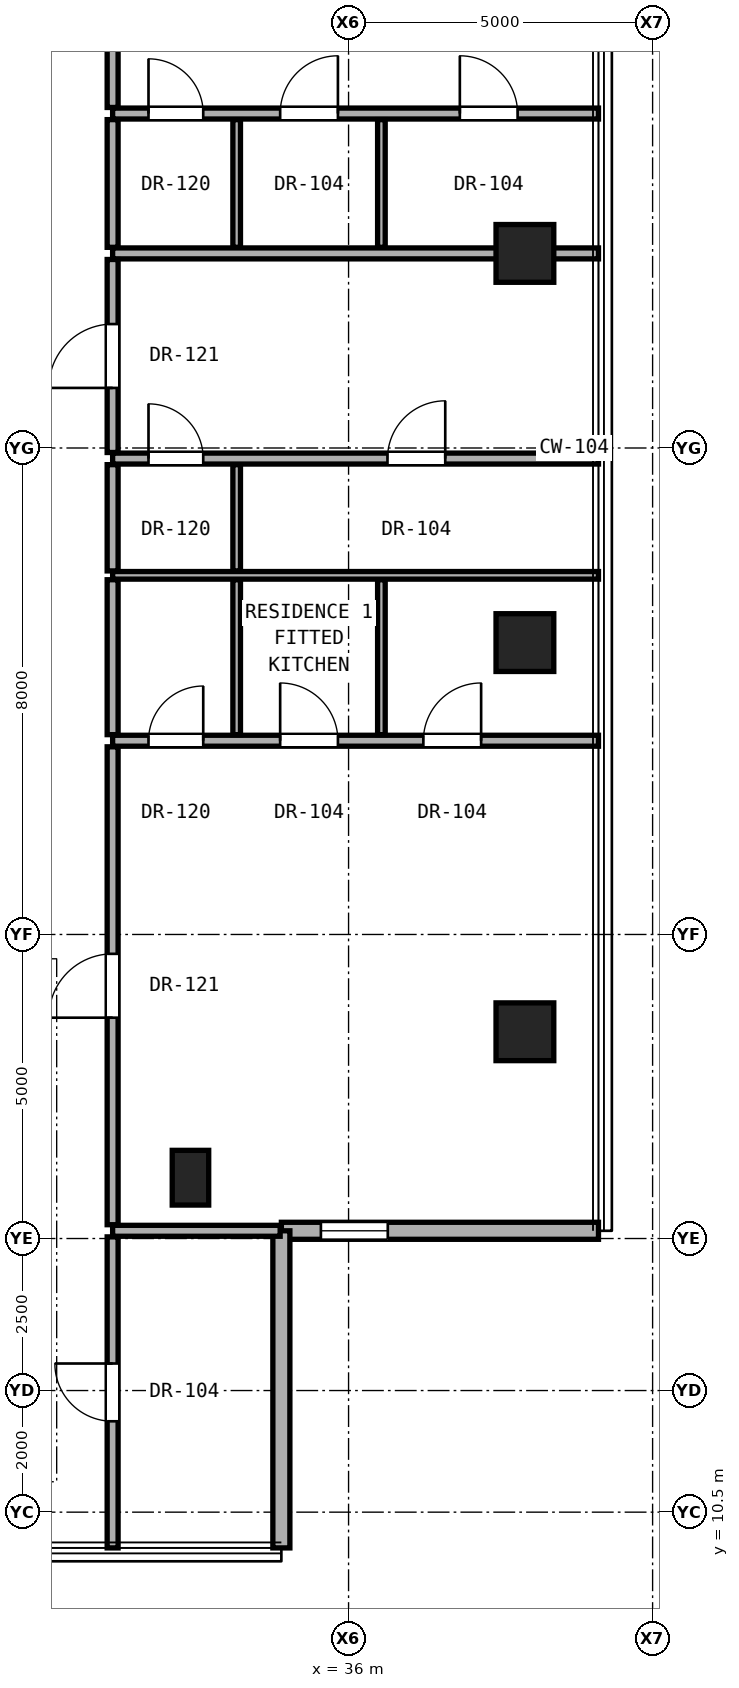
"""IFC4 building model, lengths in metres.
Left out: names, types, materials, properties, quantities, classifications, styles, units other than length and angle.
Written with IfcOpenShell. Run it as: python <this file> out.ifc"""

import sys

from ifc_helpers import new_model, si_unit, direction, frame, frame_2d, origin, origin_2d, place, context, subcontext, project, spatial, rectangle, hollow_rectangle, extrude, element, fill, save


model = new_model("IFC4")
c1 = context("Model", 3, precision=1e-05, world=origin(), true_north=direction((0.0, 1.0)))
c2 = subcontext(c1, "Body", "Model", "MODEL_VIEW")
j1 = project(units=[si_unit("LENGTHUNIT", "METRE"), si_unit("PLANEANGLEUNIT", "RADIAN")], contexts=[c1])
p1 = place(None, origin())
s1 = spatial("IfcSite", under=j1, at=p1, CompositionType="ELEMENT")
p2 = place(p1, origin())
s2 = spatial("IfcBuilding", under=s1, at=p2, CompositionType="ELEMENT")
p3 = place(p2, frame((0.0, 0.0, 186.9)))
s3 = spatial("IfcBuildingStorey", under=s2, at=p3, CompositionType="ELEMENT", Elevation=186.9)
for number, where, z_axis, x_axis in (
    (1, (38.9, 18.4, 0.0), (0.0, 0.0, 1.0), (1.0, 0.0, 0.0)),
    (2, (38.9, 24.8, 0.0), (0.0, 0.0, 1.0), (1.0, 0.0, 0.0)),
    (3, (38.9, 31.2, 0.0), (0.0, 0.0, 1.0), (1.0, 0.0, 0.0)),
):
    element("IfcColumn", number, at=place(p3, frame(where, z_axis=z_axis, x_axis=x_axis)), inside=s3, PredefinedType="COLUMN", context=c2, shape_type="SweptSolid", body=[
        extrude(hollow_rectangle(XDim=0.95, YDim=0.95, WallThickness=0.05, at=origin_2d()), origin(), (0.0, 0.0, 1.0), 3.25),
    ])
p4 = place(p3, frame((33.4, 16.0, 0.0), z_axis=(0.0, 0.0, 1.0), x_axis=(1.0, 0.0, 0.0)))
e4 = element("IfcColumn", 4, at=p4, inside=s3, PredefinedType="PILASTER", context=c2, shape_type="SweptSolid", body=[
    extrude(rectangle(XDim=0.6, YDim=0.9, at=origin_2d()), origin(), (0.0, 0.0, 1.0), 3.25),
])
p5 = place(p3, frame((34.895, 15.127, 0.0), z_axis=(0.0, 0.0, 1.0), x_axis=(1.0, 0.0, 0.0)))
e5 = element("IfcWall", 5, at=p5, inside=s3, PredefinedType="SOLIDWALL", context=c2, shape_type="SweptSolid", body=[
    extrude(rectangle(XDim=5.215, YDim=0.28, at=frame_2d((2.607, 0.0))), origin(), (0.0, 0.0, 1.0), 3.03),
])
p6 = place(p5, frame((0.65, 0.0, 0.85)))
e6 = element("IfcOpeningElement", 6, at=p6, cuts=e5, PredefinedType="OPENING", context=c2, shape_type="SweptSolid", body=[
    extrude(rectangle(XDim=1.1, YDim=2.0, at=frame_2d((0.55, 1.0))), frame((0.0, 0.15, 0.0), z_axis=(0.0, -1.0, 0.0), x_axis=(1.0, 0.0, 0.0)), (0.0, 0.0, 1.0), 0.3),
])
p7 = place(p3, frame((34.895, 9.912, 0.0), z_axis=(0.0, 0.0, 1.0), x_axis=(0.0, 1.0, 0.0)))
e7 = element("IfcWall", 7, at=p7, inside=s3, PredefinedType="SOLIDWALL", context=c2, shape_type="SweptSolid", body=[
    extrude(rectangle(XDim=5.215, YDim=0.28, at=frame_2d((2.607, 0.0))), origin(), (0.0, 0.0, 1.0), 3.03),
])
p8 = place(p3, frame((32.12, 15.127, 0.0), z_axis=(0.0, 0.0, 1.0), x_axis=(1.0, 0.0, 0.0)))
e8 = element("IfcWall", 8, at=p8, inside=s3, PredefinedType="PARTITIONING", context=c2, shape_type="SweptSolid", body=[
    extrude(rectangle(XDim=2.755, YDim=0.18, at=frame_2d((1.377, 0.0))), origin(), (0.0, 0.0, 1.0), 3.05),
])
p9 = place(p3, frame((32.12, 23.186, 0.0), z_axis=(0.0, 0.0, 1.0), x_axis=(1.0, 0.0, 0.0)))
e9 = element("IfcWall", 9, at=p9, inside=s3, PredefinedType="PARTITIONING", context=c2, shape_type="SweptSolid", body=[
    extrude(rectangle(XDim=7.99, YDim=0.18, at=frame_2d((3.995, 0.0))), origin(), (0.0, 0.0, 1.0), 2.269),
])
p10 = place(p9, frame((5.11, 0.0, 0.0)))
e10 = element("IfcOpeningElement", 10, at=p10, cuts=e9, PredefinedType="OPENING", context=c2, shape_type="SweptSolid", body=[
    extrude(rectangle(XDim=0.95, YDim=2.15, at=frame_2d((0.475, 1.075))), frame((0.0, 0.1, 0.0), z_axis=(0.0, -1.0, 0.0), x_axis=(1.0, 0.0, 0.0)), (0.0, 0.0, 1.0), 0.2),
])
p11 = place(p9, frame((2.755, 0.0, 0.0)))
e11 = element("IfcOpeningElement", 11, at=p11, cuts=e9, PredefinedType="OPENING", context=c2, shape_type="SweptSolid", body=[
    extrude(rectangle(XDim=0.95, YDim=2.15, at=frame_2d((0.475, 1.075))), frame((0.0, 0.1, 0.0), z_axis=(0.0, -1.0, 0.0), x_axis=(1.0, 0.0, 0.0)), (0.0, 0.0, 1.0), 0.2),
])
p12 = place(p9, frame((0.59, 0.0, 0.0)))
e12 = element("IfcOpeningElement", 12, at=p12, cuts=e9, PredefinedType="OPENING", context=c2, shape_type="SweptSolid", body=[
    extrude(rectangle(XDim=0.9, YDim=2.1, at=frame_2d((0.45, 1.05))), frame((0.0, 0.1, 0.0), z_axis=(0.0, -1.0, 0.0), x_axis=(1.0, 0.0, 0.0)), (0.0, 0.0, 1.0), 0.2),
])
p13 = place(p3, frame((32.12, 25.906, 0.0), z_axis=(0.0, 0.0, 1.0), x_axis=(1.0, 0.0, 0.0)))
e13 = element("IfcWall", 13, at=p13, inside=s3, PredefinedType="PARTITIONING", context=c2, shape_type="SweptSolid", body=[
    extrude(rectangle(XDim=7.99, YDim=0.125, at=frame_2d((3.995, 0.0))), origin(), (0.0, 0.0, 1.0), 2.269),
])
p14 = place(p3, frame((32.12, 27.826, 0.0), z_axis=(0.0, 0.0, 1.0), x_axis=(1.0, 0.0, 0.0)))
e14 = element("IfcWall", 14, at=p14, inside=s3, PredefinedType="PARTITIONING", context=c2, shape_type="SweptSolid", body=[
    extrude(rectangle(XDim=7.99, YDim=0.18, at=frame_2d((3.995, 0.0))), origin(), (0.0, 0.0, 1.0), 2.269),
])
p15 = place(p14, frame((4.52, 0.0, 0.0)))
e15 = element("IfcOpeningElement", 15, at=p15, cuts=e14, PredefinedType="OPENING", context=c2, shape_type="SweptSolid", body=[
    extrude(rectangle(XDim=0.95, YDim=2.15, at=frame_2d((0.475, 1.075))), frame((0.0, 0.1, 0.0), z_axis=(0.0, -1.0, 0.0), x_axis=(1.0, 0.0, 0.0)), (0.0, 0.0, 1.0), 0.2),
])
p16 = place(p14, frame((0.59, 0.0, 0.0)))
e16 = element("IfcOpeningElement", 16, at=p16, cuts=e14, PredefinedType="OPENING", context=c2, shape_type="SweptSolid", body=[
    extrude(rectangle(XDim=0.9, YDim=2.1, at=frame_2d((0.45, 1.05))), frame((0.0, 0.1, 0.0), z_axis=(0.0, -1.0, 0.0), x_axis=(1.0, 0.0, 0.0)), (0.0, 0.0, 1.0), 0.2),
])
p17 = place(p3, frame((32.12, 31.2, 0.0), z_axis=(0.0, 0.0, 1.0), x_axis=(1.0, 0.0, 0.0)))
e17 = element("IfcWall", 17, at=p17, inside=s3, PredefinedType="PARTITIONING", context=c2, shape_type="SweptSolid", body=[
    extrude(rectangle(XDim=7.99, YDim=0.18, at=frame_2d((3.995, 0.0))), origin(), (0.0, 0.0, 1.0), 2.269),
])
p18 = place(p3, frame((32.12, 33.5, 0.0), z_axis=(0.0, 0.0, 1.0), x_axis=(1.0, 0.0, 0.0)))
e18 = element("IfcWall", 18, at=p18, inside=s3, PredefinedType="PARTITIONING", context=c2, shape_type="SweptSolid", body=[
    extrude(rectangle(XDim=7.99, YDim=0.18, at=frame_2d((3.995, 0.0))), origin(), (0.0, 0.0, 1.0), 2.269),
])
p19 = place(p18, frame((5.71, 0.0, 0.0)))
e19 = element("IfcOpeningElement", 19, at=p19, cuts=e18, PredefinedType="OPENING", context=c2, shape_type="SweptSolid", body=[
    extrude(rectangle(XDim=0.95, YDim=2.15, at=frame_2d((0.475, 1.075))), frame((0.0, 0.1, 0.0), z_axis=(0.0, -1.0, 0.0), x_axis=(1.0, 0.0, 0.0)), (0.0, 0.0, 1.0), 0.2),
])
p20 = place(p18, frame((2.755, 0.0, 0.0)))
e20 = element("IfcOpeningElement", 20, at=p20, cuts=e18, PredefinedType="OPENING", context=c2, shape_type="SweptSolid", body=[
    extrude(rectangle(XDim=0.95, YDim=2.15, at=frame_2d((0.475, 1.075))), frame((0.0, 0.1, 0.0), z_axis=(0.0, -1.0, 0.0), x_axis=(1.0, 0.0, 0.0)), (0.0, 0.0, 1.0), 0.2),
])
p21 = place(p18, frame((0.59, 0.0, 0.0)))
e21 = element("IfcOpeningElement", 21, at=p21, cuts=e18, PredefinedType="OPENING", context=c2, shape_type="SweptSolid", body=[
    extrude(rectangle(XDim=0.9, YDim=2.1, at=frame_2d((0.45, 1.05))), frame((0.0, 0.1, 0.0), z_axis=(0.0, -1.0, 0.0), x_axis=(1.0, 0.0, 0.0)), (0.0, 0.0, 1.0), 0.2),
])
p22 = place(p3, frame((32.12, 9.912, 0.0), z_axis=(0.0, 0.0, 1.0), x_axis=(0.0, 1.0, 0.0)))
e22 = element("IfcWall", 22, at=p22, inside=s3, PredefinedType="PARTITIONING", context=c2, shape_type="SweptSolid", body=[
    extrude(rectangle(XDim=5.115, YDim=0.18, at=frame_2d((2.558, 0.0))), origin(), (0.0, 0.0, 1.0), 3.05),
])
p23 = place(p22, frame((2.083, 0.0, 0.0)))
e23 = element("IfcOpeningElement", 23, at=p23, cuts=e22, PredefinedType="OPENING", context=c2, shape_type="SweptSolid", body=[
    extrude(rectangle(XDim=0.95, YDim=2.15, at=frame_2d((0.475, 1.075))), frame((0.0, 0.1, 0.0), z_axis=(0.0, -1.0, 0.0), x_axis=(1.0, 0.0, 0.0)), (0.0, 0.0, 1.0), 0.2),
])
p24 = place(p3, frame((32.12, 15.227, 0.0), z_axis=(0.0, 0.0, 1.0), x_axis=(0.0, 1.0, 0.0)))
e24 = element("IfcWall", 24, at=p24, inside=s3, PredefinedType="PARTITIONING", context=c2, shape_type="SweptSolid", body=[
    extrude(rectangle(XDim=7.859, YDim=0.18, at=frame_2d((3.929, 0.0))), origin(), (0.0, 0.0, 1.0), 2.442),
])
p25 = place(p24, frame((3.405, 0.0, 0.0)))
e25 = element("IfcOpeningElement", 25, at=p25, cuts=e24, PredefinedType="OPENING", context=c2, shape_type="SweptSolid", body=[
    extrude(rectangle(XDim=1.05, YDim=2.2, at=frame_2d((0.525, 1.1))), frame((0.0, 0.1, 0.0), z_axis=(0.0, -1.0, 0.0), x_axis=(1.0, 0.0, 0.0)), (0.0, 0.0, 1.0), 0.2),
])
p26 = place(p3, frame((32.12, 23.286, 0.0), z_axis=(0.0, 0.0, 1.0), x_axis=(0.0, 1.0, 0.0)))
e26 = element("IfcWall", 26, at=p26, inside=s3, PredefinedType="PARTITIONING", context=c2, shape_type="SweptSolid", body=[
    extrude(rectangle(XDim=2.548, YDim=0.18, at=frame_2d((1.274, 0.0))), origin(), (0.0, 0.0, 1.0), 2.346),
])
p27 = place(p3, frame((32.12, 25.979, 0.0), z_axis=(0.0, 0.0, 1.0), x_axis=(0.0, 1.0, 0.0)))
e27 = element("IfcWall", 27, at=p27, inside=s3, PredefinedType="PARTITIONING", context=c2, shape_type="SweptSolid", body=[
    extrude(rectangle(XDim=1.748, YDim=0.18, at=frame_2d((0.874, 0.0))), origin(), (0.0, 0.0, 1.0), 3.05),
])
p28 = place(p3, frame((32.12, 27.926, 0.0), z_axis=(0.0, 0.0, 1.0), x_axis=(0.0, 1.0, 0.0)))
e28 = element("IfcWall", 28, at=p28, inside=s3, PredefinedType="PARTITIONING", context=c2, shape_type="SweptSolid", body=[
    extrude(rectangle(XDim=3.174, YDim=0.18, at=frame_2d((1.587, 0.0))), origin(), (0.0, 0.0, 1.0), 2.346),
])
p29 = place(p28, frame((1.062, 0.0, 0.0)))
e29 = element("IfcOpeningElement", 29, at=p29, cuts=e28, PredefinedType="OPENING", context=c2, shape_type="SweptSolid", body=[
    extrude(rectangle(XDim=1.05, YDim=2.2, at=frame_2d((0.525, 1.1))), frame((0.0, 0.1, 0.0), z_axis=(0.0, -1.0, 0.0), x_axis=(1.0, 0.0, 0.0)), (0.0, 0.0, 1.0), 0.2),
])
p30 = place(p3, frame((32.12, 31.3, 0.0), z_axis=(0.0, 0.0, 1.0), x_axis=(0.0, 1.0, 0.0)))
e30 = element("IfcWall", 30, at=p30, inside=s3, PredefinedType="PARTITIONING", context=c2, shape_type="SweptSolid", body=[
    extrude(rectangle(XDim=2.1, YDim=0.18, at=frame_2d((1.05, 0.0))), origin(), (0.0, 0.0, 1.0), 2.346),
])
p31 = place(p3, frame((32.12, 33.6, 0.0), z_axis=(0.0, 0.0, 1.0), x_axis=(0.0, 1.0, 0.0)))
e31 = element("IfcWall", 31, at=p31, inside=s3, PredefinedType="PARTITIONING", context=c2, shape_type="SweptSolid", body=[
    extrude(rectangle(XDim=7.173, YDim=0.18, at=frame_2d((3.586, 0.0))), origin(), (0.0, 0.0, 1.0), 2.442),
])
p32 = place(p31, frame((3.062, 0.0, 0.0)))
e32 = element("IfcOpeningElement", 32, at=p32, cuts=e31, PredefinedType="OPENING", context=c2, shape_type="SweptSolid", body=[
    extrude(rectangle(XDim=1.05, YDim=2.2, at=frame_2d((0.525, 1.1))), frame((0.0, 0.1, 0.0), z_axis=(0.0, -1.0, 0.0), x_axis=(1.0, 0.0, 0.0)), (0.0, 0.0, 1.0), 0.2),
])
p33 = place(p3, frame((34.16, 23.286, 0.0), z_axis=(0.0, 0.0, 1.0), x_axis=(0.0, 1.0, 0.0)))
e33 = element("IfcWall", 33, at=p33, inside=s3, PredefinedType="PARTITIONING", context=c2, shape_type="SweptSolid", body=[
    extrude(rectangle(XDim=2.548, YDim=0.125, at=frame_2d((1.274, 0.0))), origin(), (0.0, 0.0, 1.0), 2.346),
])
p34 = place(p3, frame((34.16, 25.979, 0.0), z_axis=(0.0, 0.0, 1.0), x_axis=(0.0, 1.0, 0.0)))
e34 = element("IfcWall", 34, at=p34, inside=s3, PredefinedType="PARTITIONING", context=c2, shape_type="SweptSolid", body=[
    extrude(rectangle(XDim=1.748, YDim=0.125, at=frame_2d((0.874, 0.0))), origin(), (0.0, 0.0, 1.0), 3.05),
])
p35 = place(p3, frame((34.16, 31.3, 0.0), z_axis=(0.0, 0.0, 1.0), x_axis=(0.0, 1.0, 0.0)))
e35 = element("IfcWall", 35, at=p35, inside=s3, PredefinedType="PARTITIONING", context=c2, shape_type="SweptSolid", body=[
    extrude(rectangle(XDim=2.1, YDim=0.125, at=frame_2d((1.05, 0.0))), origin(), (0.0, 0.0, 1.0), 2.346),
])
p36 = place(p3, frame((36.54, 23.286, 0.0), z_axis=(0.0, 0.0, 1.0), x_axis=(0.0, 1.0, 0.0)))
e36 = element("IfcWall", 36, at=p36, inside=s3, PredefinedType="PARTITIONING", context=c2, shape_type="SweptSolid", body=[
    extrude(rectangle(XDim=2.548, YDim=0.125, at=frame_2d((1.274, 0.0))), origin(), (0.0, 0.0, 1.0), 2.346),
])
p37 = place(p3, frame((36.54, 31.3, 0.0), z_axis=(0.0, 0.0, 1.0), x_axis=(0.0, 1.0, 0.0)))
e37 = element("IfcWall", 37, at=p37, inside=s3, PredefinedType="PARTITIONING", context=c2, shape_type="SweptSolid", body=[
    extrude(rectangle(XDim=2.1, YDim=0.125, at=frame_2d((1.05, 0.0))), origin(), (0.0, 0.0, 1.0), 2.346),
])
p38 = place(p6, origin())
e38 = element("IfcWindow", 38, at=p38, inside=s3, PartitioningType="SINGLE_PANEL", PredefinedType="WINDOW", context=c2, shape_type="SweptSolid", body=[
    extrude(rectangle(XDim=1.1, YDim=2.0, at=frame_2d((0.55, 1.0))), frame((0.0, 0.03, 0.0), z_axis=(0.0, -1.0, 0.0), x_axis=(1.0, 0.0, 0.0)), (0.0, 0.0, 1.0), 0.06),
])
fill(e6, e38)
p39 = place(p25, origin())
e39 = element("IfcDoor", 39, at=p39, inside=s3, OperationType="SINGLE_SWING_LEFT", PredefinedType="DOOR", context=c2, shape_type="SweptSolid", body=[
    extrude(rectangle(XDim=1.05, YDim=2.2, at=frame_2d((0.525, 1.1))), frame((0.0, 0.025, 0.0), z_axis=(0.0, -1.0, 0.0), x_axis=(1.0, 0.0, 0.0)), (0.0, 0.0, 1.0), 0.05),
])
fill(e25, e39)
p40 = place(p10, origin())
e40 = element("IfcDoor", 40, at=p40, inside=s3, OperationType="SINGLE_SWING_RIGHT", PredefinedType="DOOR", context=c2, shape_type="SweptSolid", body=[
    extrude(rectangle(XDim=0.95, YDim=2.15, at=frame_2d((0.475, 1.075))), frame((0.0, 0.025, 0.0), z_axis=(0.0, -1.0, 0.0), x_axis=(1.0, 0.0, 0.0)), (0.0, 0.0, 1.0), 0.05),
])
fill(e10, e40)
p41 = place(p11, origin())
e41 = element("IfcDoor", 41, at=p41, inside=s3, OperationType="SINGLE_SWING_LEFT", PredefinedType="DOOR", context=c2, shape_type="SweptSolid", body=[
    extrude(rectangle(XDim=0.95, YDim=2.15, at=frame_2d((0.475, 1.075))), frame((0.0, 0.025, 0.0), z_axis=(0.0, -1.0, 0.0), x_axis=(1.0, 0.0, 0.0)), (0.0, 0.0, 1.0), 0.05),
])
fill(e11, e41)
p42 = place(p12, origin())
e42 = element("IfcDoor", 42, at=p42, inside=s3, OperationType="SINGLE_SWING_RIGHT", PredefinedType="DOOR", context=c2, shape_type="SweptSolid", body=[
    extrude(rectangle(XDim=0.9, YDim=2.1, at=frame_2d((0.45, 1.05))), frame((0.0, 0.025, 0.0), z_axis=(0.0, -1.0, 0.0), x_axis=(1.0, 0.0, 0.0)), (0.0, 0.0, 1.0), 0.05),
])
fill(e12, e42)
p43 = place(p29, origin())
e43 = element("IfcDoor", 43, at=p43, inside=s3, OperationType="SINGLE_SWING_LEFT", PredefinedType="DOOR", context=c2, shape_type="SweptSolid", body=[
    extrude(rectangle(XDim=1.05, YDim=2.2, at=frame_2d((0.525, 1.1))), frame((0.0, 0.025, 0.0), z_axis=(0.0, -1.0, 0.0), x_axis=(1.0, 0.0, 0.0)), (0.0, 0.0, 1.0), 0.05),
])
fill(e29, e43)
p44 = place(p15, origin())
e44 = element("IfcDoor", 44, at=p44, inside=s3, OperationType="SINGLE_SWING_RIGHT", PredefinedType="DOOR", context=c2, shape_type="SweptSolid", body=[
    extrude(rectangle(XDim=0.95, YDim=2.15, at=frame_2d((0.475, 1.075))), frame((0.0, 0.025, 0.0), z_axis=(0.0, -1.0, 0.0), x_axis=(1.0, 0.0, 0.0)), (0.0, 0.0, 1.0), 0.05),
])
fill(e15, e44)
p45 = place(p16, origin())
e45 = element("IfcDoor", 45, at=p45, inside=s3, OperationType="SINGLE_SWING_LEFT", PredefinedType="DOOR", context=c2, shape_type="SweptSolid", body=[
    extrude(rectangle(XDim=0.9, YDim=2.1, at=frame_2d((0.45, 1.05))), frame((0.0, 0.025, 0.0), z_axis=(0.0, -1.0, 0.0), x_axis=(1.0, 0.0, 0.0)), (0.0, 0.0, 1.0), 0.05),
])
fill(e16, e45)
p46 = place(p19, origin())
e46 = element("IfcDoor", 46, at=p46, inside=s3, OperationType="SINGLE_SWING_LEFT", PredefinedType="DOOR", context=c2, shape_type="SweptSolid", body=[
    extrude(rectangle(XDim=0.95, YDim=2.15, at=frame_2d((0.475, 1.075))), frame((0.0, 0.025, 0.0), z_axis=(0.0, -1.0, 0.0), x_axis=(1.0, 0.0, 0.0)), (0.0, 0.0, 1.0), 0.05),
])
fill(e19, e46)
p47 = place(p20, origin())
e47 = element("IfcDoor", 47, at=p47, inside=s3, OperationType="SINGLE_SWING_RIGHT", PredefinedType="DOOR", context=c2, shape_type="SweptSolid", body=[
    extrude(rectangle(XDim=0.95, YDim=2.15, at=frame_2d((0.475, 1.075))), frame((0.0, 0.025, 0.0), z_axis=(0.0, -1.0, 0.0), x_axis=(1.0, 0.0, 0.0)), (0.0, 0.0, 1.0), 0.05),
])
fill(e20, e47)
p48 = place(p21, origin())
e48 = element("IfcDoor", 48, at=p48, inside=s3, OperationType="SINGLE_SWING_LEFT", PredefinedType="DOOR", context=c2, shape_type="SweptSolid", body=[
    extrude(rectangle(XDim=0.9, YDim=2.1, at=frame_2d((0.45, 1.05))), frame((0.0, 0.025, 0.0), z_axis=(0.0, -1.0, 0.0), x_axis=(1.0, 0.0, 0.0)), (0.0, 0.0, 1.0), 0.05),
])
fill(e21, e48)
p49 = place(p23, origin())
e49 = element("IfcDoor", 49, at=p49, inside=s3, OperationType="SINGLE_SWING_RIGHT", PredefinedType="DOOR", context=c2, shape_type="SweptSolid", body=[
    extrude(rectangle(XDim=0.95, YDim=2.15, at=frame_2d((0.475, 1.075))), frame((0.0, 0.025, 0.0), z_axis=(0.0, -1.0, 0.0), x_axis=(1.0, 0.0, 0.0)), (0.0, 0.0, 1.0), 0.05),
])
fill(e23, e49)
save(model, sys.argv[1])
